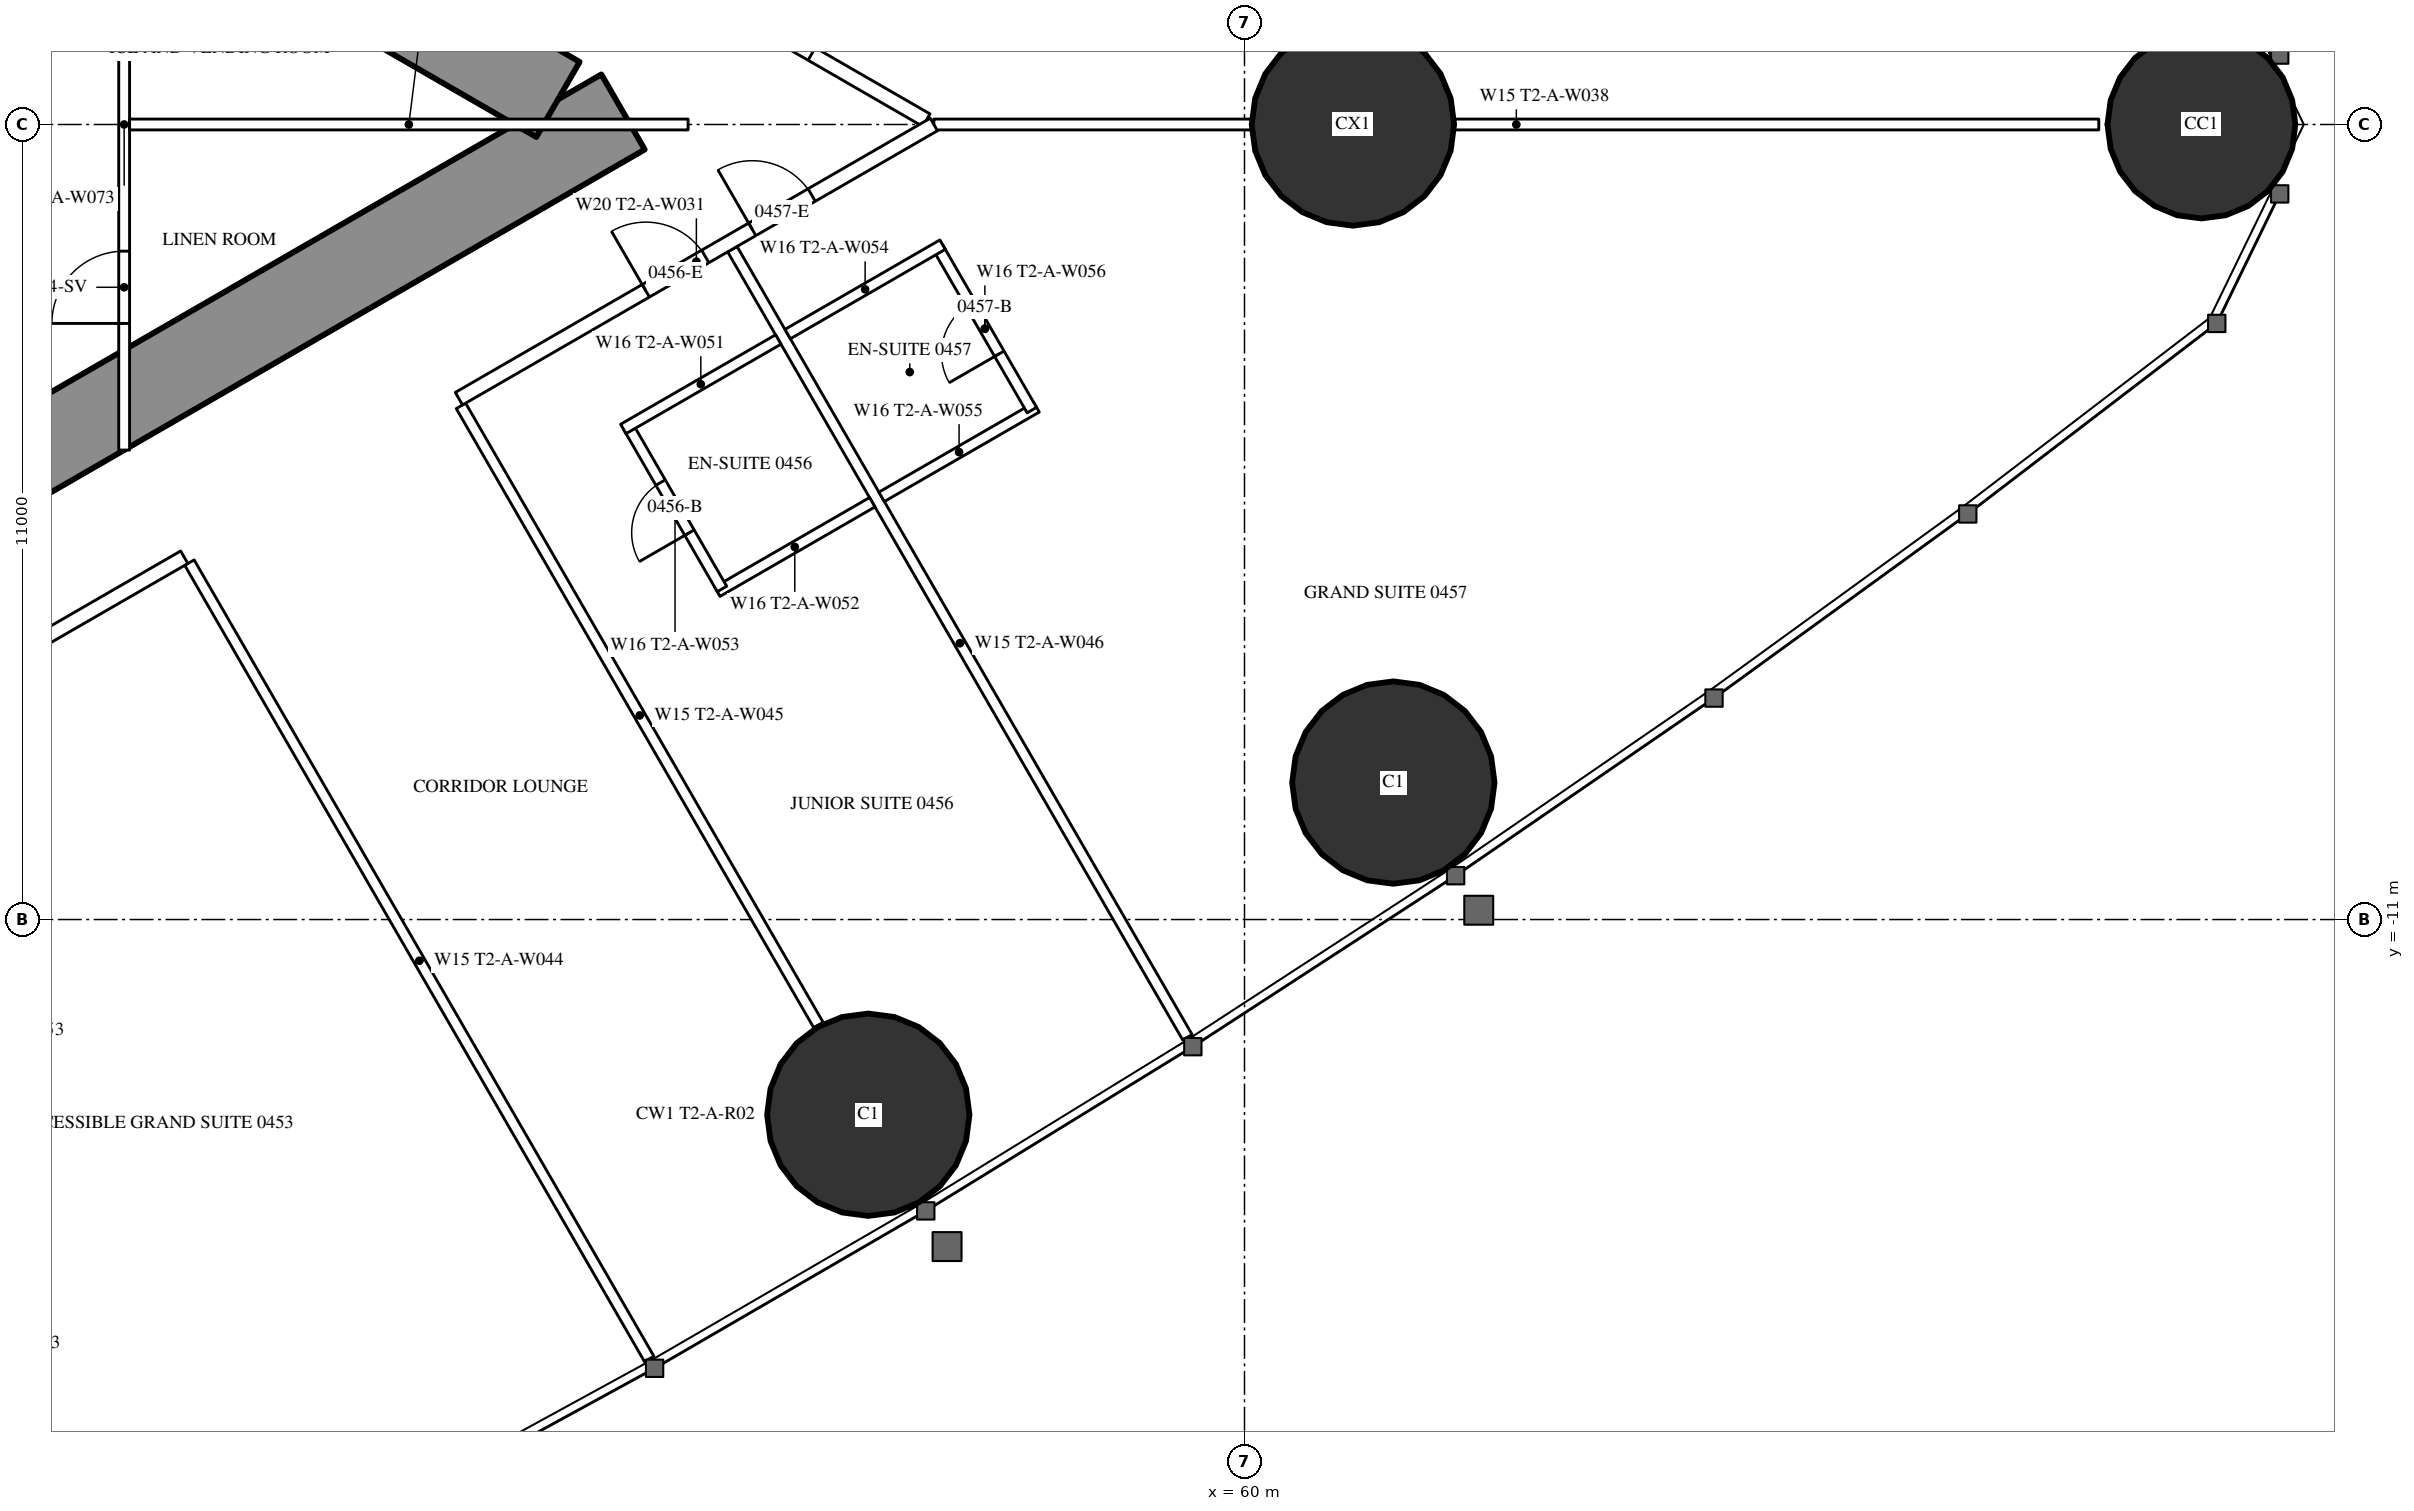
"""IFC4 building model, lengths in metres.
Left out: names, types, materials, properties, quantities, classifications, styles, units other than length and angle.
Written with IfcOpenShell. Run it as: python <this file> out.ifc"""

import sys

from ifc_helpers import new_model, si_unit, direction, frame, frame_2d, origin, origin_2d, place, context, subcontext, project, spatial, rectangle, hollow_circle, extrude, element, fill, save


model = new_model("IFC4")
c1 = context("Model", 3, precision=1e-05, world=origin(), true_north=direction((0.0, 1.0)))
c2 = subcontext(c1, "Body", "Model", "MODEL_VIEW")
j1 = project(units=[si_unit("LENGTHUNIT", "METRE"), si_unit("PLANEANGLEUNIT", "RADIAN")], contexts=[c1])
p1 = place(None, origin())
s1 = spatial("IfcSite", under=j1, at=p1, CompositionType="ELEMENT")
p2 = place(p1, origin())
s2 = spatial("IfcBuilding", under=s1, at=p2, CompositionType="ELEMENT")
p3 = place(p2, frame((0.0, 0.0, 21.5)))
s3 = spatial("IfcBuildingStorey", under=s2, at=p3, CompositionType="ELEMENT", Elevation=21.5)
p4 = place(p3, frame((73.239, 0.0, 0.0), z_axis=(0.0, 0.0, 1.0), x_axis=(1.0, 0.0, 0.0)))
e1 = element("IfcColumn", 1, at=p4, inside=s3, PredefinedType="COLUMN", context=c2, shape_type="SweptSolid", body=[
    extrude(hollow_circle(Radius=1.3, WallThickness=0.1, at=origin_2d()), origin(), (0.0, 0.0, 1.0), 3.5),
])
for number, where, z_axis, x_axis in (
    (2, (54.795, -13.701, 0.0), (0.0, 0.0, 1.0), (1.0, 0.0, 0.0)),
    (3, (62.059, -9.105, 0.0), (0.0, 0.0, 1.0), (1.0, 0.0, 0.0)),
):
    element("IfcColumn", number, at=place(p3, frame(where, z_axis=z_axis, x_axis=x_axis)), inside=s3, PredefinedType="COLUMN", context=c2, shape_type="SweptSolid", body=[
        extrude(hollow_circle(Radius=1.4, WallThickness=0.12, at=origin_2d()), origin(), (0.0, 0.0, 1.0), 3.5),
    ])
p5 = place(p3, frame((61.5, 0.0, 0.0), z_axis=(0.0, 0.0, 1.0), x_axis=(1.0, 0.0, 0.0)))
e4 = element("IfcColumn", 4, at=p5, inside=s3, PredefinedType="COLUMN", context=c2, shape_type="SweptSolid", body=[
    extrude(hollow_circle(Radius=1.4, WallThickness=0.1, at=origin_2d()), origin(), (0.0, 0.0, 1.0), 3.5),
])
p6 = place(p3, frame((27.2, -13.8, 0.0), z_axis=(0.0, 0.0, 1.0), x_axis=(0.866027159892, 0.499996958321, 0.0)))
e5 = element("IfcWall", 5, at=p6, inside=s3, PredefinedType="SHEAR", context=c2, shape_type="SweptSolid", body=[
    extrude(rectangle(XDim=27.947, YDim=1.2, at=frame_2d((13.973, 0.0))), origin(), (0.0, 0.0, 1.0), 3.5),
])
p7 = place(p6, frame((4.6, 0.0, 0.0)))
e6 = element("IfcOpeningElement", 6, at=p7, cuts=e5, PredefinedType="OPENING", context=c2, shape_type="SweptSolid", body=[
    extrude(rectangle(XDim=1.0, YDim=2.2, at=frame_2d((0.5, 1.1))), frame((0.0, 0.61, 0.0), z_axis=(0.0, -1.0, 0.0), x_axis=(1.0, 0.0, 0.0)), (0.0, 0.0, 1.0), 1.22),
])
p8 = place(p6, frame((13.395, 0.0, 0.0)))
e7 = element("IfcOpeningElement", 7, at=p8, cuts=e5, PredefinedType="OPENING", context=c2, shape_type="SweptSolid", body=[
    extrude(rectangle(XDim=1.8, YDim=2.2, at=frame_2d((0.9, 1.1))), frame((0.0, 0.61, 0.0), z_axis=(0.0, -1.0, 0.0), x_axis=(1.0, 0.0, 0.0)), (0.0, 0.0, 1.0), 1.22),
])
p9 = place(p3, frame((27.2, 13.8, 0.0), z_axis=(0.0, 0.0, 1.0), x_axis=(0.866024515034, -0.500001539357, 0.0)))
e8 = element("IfcWall", 8, at=p9, inside=s3, PredefinedType="SHEAR", context=c2, shape_type="SweptSolid", body=[
    extrude(rectangle(XDim=26.907, YDim=1.2, at=frame_2d((13.454, 0.0))), origin(), (0.0, 0.0, 1.0), 3.5),
])
p10 = place(p9, frame((4.6, 0.0, 0.0)))
e9 = element("IfcOpeningElement", 9, at=p10, cuts=e8, PredefinedType="OPENING", context=c2, shape_type="SweptSolid", body=[
    extrude(rectangle(XDim=1.0, YDim=2.2, at=frame_2d((0.5, 1.1))), frame((0.0, 0.61, 0.0), z_axis=(0.0, -1.0, 0.0), x_axis=(1.0, 0.0, 0.0)), (0.0, 0.0, 1.0), 1.22),
])
p11 = place(p9, frame((13.395, 0.0, 0.0)))
e10 = element("IfcOpeningElement", 10, at=p11, cuts=e8, PredefinedType="OPENING", context=c2, shape_type="SweptSolid", body=[
    extrude(rectangle(XDim=1.8, YDim=2.2, at=frame_2d((0.9, 1.1))), frame((0.0, 0.61, 0.0), z_axis=(0.0, -1.0, 0.0), x_axis=(1.0, 0.0, 0.0)), (0.0, 0.0, 1.0), 1.22),
])
p12 = place(p3, frame((45.403, -6.062, 0.0), z_axis=(0.0, 0.0, 1.0), x_axis=(0.500007077968, -0.866021317279, 0.0)))
e11 = element("IfcWall", 11, at=p12, inside=s3, PredefinedType="PARTITIONING", context=c2, shape_type="SweptSolid", body=[
    extrude(rectangle(XDim=12.721, YDim=0.15, at=frame_2d((6.361, 0.0))), origin(), (0.0, 0.0, 1.0), 3.25),
])
p13 = place(p3, frame((49.159, -3.893, 0.0), z_axis=(0.0, 0.0, 1.0), x_axis=(0.499998773722, -0.866026111775, 0.0)))
e12 = element("IfcWall", 12, at=p13, inside=s3, PredefinedType="PARTITIONING", context=c2, shape_type="SweptSolid", body=[
    extrude(rectangle(XDim=9.892, YDim=0.15, at=frame_2d((4.946, 0.0))), origin(), (0.0, 0.0, 1.0), 2.25),
])
p14 = place(p3, frame((52.915, -1.725, 0.0), z_axis=(0.0, 0.0, 1.0), x_axis=(0.499997163113, -0.866027041656, 0.0)))
e13 = element("IfcWall", 13, at=p14, inside=s3, PredefinedType="PARTITIONING", context=c2, shape_type="SweptSolid", body=[
    extrude(rectangle(XDim=12.591, YDim=0.15, at=frame_2d((6.295, 0.0))), origin(), (0.0, 0.0, 1.0), 3.25),
])
p15 = place(p3, frame((55.702, 0.0, 0.0), z_axis=(0.0, 0.0, 1.0), x_axis=(1.0, 0.0, 0.0)))
e14 = element("IfcWall", 14, at=p15, inside=s3, PredefinedType="PARTITIONING", context=c2, shape_type="SweptSolid", body=[
    extrude(rectangle(XDim=16.117, YDim=0.15, at=frame_2d((8.059, 0.0))), origin(), (0.0, 0.0, 1.0), 2.25),
])
p16 = place(p3, frame((36.834, 10.894, 0.0), z_axis=(0.0, 0.0, 1.0), x_axis=(0.866028157229, -0.499995230863, 0.0)))
e15 = element("IfcWall", 15, at=p16, inside=s3, PredefinedType="PARTITIONING", context=c2, shape_type="SweptSolid", body=[
    extrude(rectangle(XDim=21.667, YDim=0.2, at=frame_2d((10.833, 0.0))), origin(), (0.0, 0.0, 1.0), 3.25),
])
p17 = place(p16, frame((18.885, 0.0, 0.0)))
e16 = element("IfcOpeningElement", 16, at=p17, cuts=e15, PredefinedType="OPENING", context=c2, shape_type="SweptSolid", body=[
    extrude(rectangle(XDim=0.95, YDim=2.2, at=frame_2d((0.475, 1.1))), frame((0.0, 0.11, 0.0), z_axis=(0.0, -1.0, 0.0), x_axis=(1.0, 0.0, 0.0)), (0.0, 0.0, 1.0), 0.22),
])
p18 = place(p16, frame((14.835, 0.0, 0.0)))
e17 = element("IfcOpeningElement", 17, at=p18, cuts=e15, PredefinedType="OPENING", context=c2, shape_type="SweptSolid", body=[
    extrude(rectangle(XDim=0.95, YDim=2.2, at=frame_2d((0.475, 1.1))), frame((0.0, 0.11, 0.0), z_axis=(0.0, -1.0, 0.0), x_axis=(1.0, 0.0, 0.0)), (0.0, 0.0, 1.0), 0.22),
])
p19 = place(p16, frame((12.85, 0.0, 0.0)))
e18 = element("IfcOpeningElement", 18, at=p19, cuts=e15, PredefinedType="OPENING", context=c2, shape_type="SweptSolid", body=[
    extrude(rectangle(XDim=0.95, YDim=2.2, at=frame_2d((0.475, 1.1))), frame((0.0, 0.11, 0.0), z_axis=(0.0, -1.0, 0.0), x_axis=(1.0, 0.0, 0.0)), (0.0, 0.0, 1.0), 0.22),
])
p20 = place(p16, frame((1.542, 0.0, 0.0)))
e19 = element("IfcOpeningElement", 19, at=p20, cuts=e15, PredefinedType="OPENING", context=c2, shape_type="SweptSolid", body=[
    extrude(rectangle(XDim=0.95, YDim=2.2, at=frame_2d((0.475, 1.1))), frame((0.0, 0.11, 0.0), z_axis=(0.0, -1.0, 0.0), x_axis=(1.0, 0.0, 0.0)), (0.0, 0.0, 1.0), 0.22),
])
p21 = place(p3, frame((37.96, -10.243, 0.0), z_axis=(0.0, 0.0, 1.0), x_axis=(0.866024617314, 0.500001362204, 0.0)))
e20 = element("IfcWall", 20, at=p21, inside=s3, PredefinedType="PARTITIONING", context=c2, shape_type="SweptSolid", body=[
    extrude(rectangle(XDim=8.512, YDim=0.2, at=frame_2d((4.256, 0.0))), origin(), (0.0, 0.0, 1.0), 3.25),
])
p22 = place(p21, frame((3.35, 0.0, 0.0)))
e21 = element("IfcOpeningElement", 21, at=p22, cuts=e20, PredefinedType="OPENING", context=c2, shape_type="SweptSolid", body=[
    extrude(rectangle(XDim=1.0, YDim=2.2, at=frame_2d((0.5, 1.1))), frame((0.0, 0.11, 0.0), z_axis=(0.0, -1.0, 0.0), x_axis=(1.0, 0.0, 0.0)), (0.0, 0.0, 1.0), 0.22),
])
p23 = place(p3, frame((49.131, -3.794, 0.0), z_axis=(0.0, 0.0, 1.0), x_axis=(0.866030732979, 0.499990769451, 0.0)))
e22 = element("IfcWall", 22, at=p23, inside=s3, PredefinedType="PARTITIONING", context=c2, shape_type="SweptSolid", body=[
    extrude(rectangle(XDim=7.588, YDim=0.2, at=frame_2d((3.794, 0.0))), origin(), (0.0, 0.0, 1.0), 3.25),
])
p24 = place(p23, frame((2.986, 0.0, 0.0)))
e23 = element("IfcOpeningElement", 23, at=p24, cuts=e22, PredefinedType="OPENING", context=c2, shape_type="SweptSolid", body=[
    extrude(rectangle(XDim=0.95, YDim=2.2, at=frame_2d((0.475, 1.1))), frame((0.0, 0.11, 0.0), z_axis=(0.0, -1.0, 0.0), x_axis=(1.0, 0.0, 0.0)), (0.0, 0.0, 1.0), 0.22),
])
p25 = place(p23, frame((4.686, 0.0, 0.0)))
e24 = element("IfcOpeningElement", 24, at=p25, cuts=e22, PredefinedType="OPENING", context=c2, shape_type="SweptSolid", body=[
    extrude(rectangle(XDim=0.95, YDim=2.2, at=frame_2d((0.475, 1.1))), frame((0.0, 0.11, 0.0), z_axis=(0.0, -1.0, 0.0), x_axis=(1.0, 0.0, 0.0)), (0.0, 0.0, 1.0), 0.22),
])
p26 = place(p3, frame((52.706, -6.464, 0.0), z_axis=(0.0, 0.0, 1.0), x_axis=(0.86604923931, 0.499958713387, 0.0)))
e25 = element("IfcWall", 25, at=p26, inside=s3, PredefinedType="PARTITIONING", context=c2, shape_type="SweptSolid", body=[
    extrude(rectangle(XDim=2.475, YDim=0.15, at=frame_2d((1.237, 0.0))), origin(), (0.0, 0.0, 1.0), 3.25),
])
p27 = place(p3, frame((51.471, -4.175, 0.0), z_axis=(0.0, 0.0, 1.0), x_axis=(0.500006934395, -0.866021400173, 0.0)))
e26 = element("IfcWall", 26, at=p27, inside=s3, PredefinedType="PARTITIONING", context=c2, shape_type="SweptSolid", body=[
    extrude(rectangle(XDim=2.6, YDim=0.15, at=frame_2d((1.3, 0.0))), origin(), (0.0, 0.0, 1.0), 3.25),
])
p28 = place(p27, frame((0.9, 0.0, 0.0)))
e27 = element("IfcOpeningElement", 27, at=p28, cuts=e26, PredefinedType="OPENING", context=c2, shape_type="SweptSolid", body=[
    extrude(rectangle(XDim=0.8, YDim=2.2, at=frame_2d((0.4, 1.1))), frame((0.0, 0.085, 0.0), z_axis=(0.0, -1.0, 0.0), x_axis=(1.0, 0.0, 0.0)), (0.0, 0.0, 1.0), 0.17),
])
p29 = place(p3, frame((51.406, -4.212, 0.0), z_axis=(0.0, 0.0, 1.0), x_axis=(0.866031185235, 0.4999899861, 0.0)))
e28 = element("IfcWall", 28, at=p29, inside=s3, PredefinedType="PARTITIONING", context=c2, shape_type="SweptSolid", body=[
    extrude(rectangle(XDim=2.475, YDim=0.15, at=frame_2d((1.238, 0.0))), origin(), (0.0, 0.0, 1.0), 3.25),
])
p30 = place(p3, frame((54.98, -5.151, 0.0), z_axis=(0.0, 0.0, 1.0), x_axis=(0.86604923931, 0.499958713387, 0.0)))
e29 = element("IfcWall", 29, at=p30, inside=s3, PredefinedType="PARTITIONING", context=c2, shape_type="SweptSolid", body=[
    extrude(rectangle(XDim=2.475, YDim=0.15, at=frame_2d((1.237, 0.0))), origin(), (0.0, 0.0, 1.0), 3.25),
])
p31 = place(p3, frame((55.758, -1.7, 0.0), z_axis=(0.0, 0.0, 1.0), x_axis=(0.500006934395, -0.866021400173, 0.0)))
e30 = element("IfcWall", 30, at=p31, inside=s3, PredefinedType="PARTITIONING", context=c2, shape_type="SweptSolid", body=[
    extrude(rectangle(XDim=2.6, YDim=0.15, at=frame_2d((1.3, 0.0))), origin(), (0.0, 0.0, 1.0), 3.25),
])
p32 = place(p31, frame((0.9, 0.0, 0.0)))
e31 = element("IfcOpeningElement", 31, at=p32, cuts=e30, PredefinedType="OPENING", context=c2, shape_type="SweptSolid", body=[
    extrude(rectangle(XDim=0.8, YDim=2.2, at=frame_2d((0.4, 1.1))), frame((0.0, 0.085, 0.0), z_axis=(0.0, -1.0, 0.0), x_axis=(1.0, 0.0, 0.0)), (0.0, 0.0, 1.0), 0.17),
])
p33 = place(p3, frame((53.68, -2.9, 0.0), z_axis=(0.0, 0.0, 1.0), x_axis=(0.866006523861, 0.500032699561, 0.0)))
e32 = element("IfcWall", 32, at=p33, inside=s3, PredefinedType="PARTITIONING", context=c2, shape_type="SweptSolid", body=[
    extrude(rectangle(XDim=2.475, YDim=0.15, at=frame_2d((1.237, 0.0))), origin(), (0.0, 0.0, 1.0), 3.25),
])
p34 = place(p3, frame((44.5, -4.505, 0.0), z_axis=(0.0, 0.0, 1.0), x_axis=(0.0, 1.0, 0.0)))
e33 = element("IfcWall", 33, at=p34, inside=s3, PredefinedType="PARTITIONING", context=c2, shape_type="SweptSolid", body=[
    extrude(rectangle(XDim=9.009, YDim=0.15, at=frame_2d((4.505, 0.0))), origin(), (0.0, 0.0, 1.0), 2.45),
])
p35 = place(p34, frame((1.752, 0.0, 0.0)))
e34 = element("IfcOpeningElement", 34, at=p35, cuts=e33, PredefinedType="OPENING", context=c2, shape_type="SweptSolid", body=[
    extrude(rectangle(XDim=1.0, YDim=2.2, at=frame_2d((0.5, 1.1))), frame((0.0, 0.085, 0.0), z_axis=(0.0, -1.0, 0.0), x_axis=(1.0, 0.0, 0.0)), (0.0, 0.0, 1.0), 0.17),
])
p36 = place(p34, frame((6.257, 0.0, 0.0)))
e35 = element("IfcOpeningElement", 35, at=p36, cuts=e33, PredefinedType="OPENING", context=c2, shape_type="SweptSolid", body=[
    extrude(rectangle(XDim=1.0, YDim=2.2, at=frame_2d((0.5, 1.1))), frame((0.0, 0.085, 0.0), z_axis=(0.0, -1.0, 0.0), x_axis=(1.0, 0.0, 0.0)), (0.0, 0.0, 1.0), 0.17),
])
p37 = place(p3, frame((44.575, 0.0, 0.0), z_axis=(0.0, 0.0, 1.0), x_axis=(1.0, 0.0, 0.0)))
e36 = element("IfcWall", 36, at=p37, inside=s3, PredefinedType="PARTITIONING", context=c2, shape_type="SweptSolid", body=[
    extrude(rectangle(XDim=7.727, YDim=0.15, at=frame_2d((3.864, 0.0))), origin(), (0.0, 0.0, 1.0), 2.25),
])
p38 = place(p28, origin())
e37 = element("IfcDoor", 37, at=p38, inside=s3, OperationType="SINGLE_SWING_RIGHT", PredefinedType="DOOR", context=c2, shape_type="SweptSolid", body=[
    extrude(rectangle(XDim=0.8, YDim=2.2, at=frame_2d((0.4, 1.1))), frame((0.0, 0.025, 0.0), z_axis=(0.0, -1.0, 0.0), x_axis=(1.0, 0.0, 0.0)), (0.0, 0.0, 1.0), 0.05),
])
fill(e27, e37)
p39 = place(p24, origin())
e38 = element("IfcDoor", 38, at=p39, inside=s3, OperationType="SINGLE_SWING_LEFT", PredefinedType="DOOR", context=c2, shape_type="SweptSolid", body=[
    extrude(rectangle(XDim=0.95, YDim=2.2, at=frame_2d((0.475, 1.1))), frame((0.0, 0.025, 0.0), z_axis=(0.0, -1.0, 0.0), x_axis=(1.0, 0.0, 0.0)), (0.0, 0.0, 1.0), 0.05),
])
fill(e23, e38)
p40 = place(p32, origin())
e39 = element("IfcDoor", 39, at=p40, inside=s3, OperationType="SINGLE_SWING_RIGHT", PredefinedType="DOOR", context=c2, shape_type="SweptSolid", body=[
    extrude(rectangle(XDim=0.8, YDim=2.2, at=frame_2d((0.4, 1.1))), frame((0.0, 0.025, 0.0), z_axis=(0.0, -1.0, 0.0), x_axis=(1.0, 0.0, 0.0)), (0.0, 0.0, 1.0), 0.05),
])
fill(e31, e39)
p41 = place(p25, origin())
e40 = element("IfcDoor", 40, at=p41, inside=s3, OperationType="SINGLE_SWING_LEFT", PredefinedType="DOOR", context=c2, shape_type="SweptSolid", body=[
    extrude(rectangle(XDim=0.95, YDim=2.2, at=frame_2d((0.475, 1.1))), frame((0.0, 0.025, 0.0), z_axis=(0.0, -1.0, 0.0), x_axis=(1.0, 0.0, 0.0)), (0.0, 0.0, 1.0), 0.05),
])
fill(e24, e40)
p42 = place(p17, origin())
e41 = element("IfcDoor", 41, at=p42, inside=s3, OperationType="SINGLE_SWING_LEFT", PredefinedType="DOOR", context=c2, shape_type="SweptSolid", body=[
    extrude(rectangle(XDim=0.95, YDim=2.2, at=frame_2d((0.475, 1.1))), frame((0.0, 0.025, 0.0), z_axis=(0.0, -1.0, 0.0), x_axis=(1.0, 0.0, 0.0)), (0.0, 0.0, 1.0), 0.05),
])
fill(e16, e41)
p43 = place(p35, origin())
e42 = element("IfcDoor", 42, at=p43, inside=s3, OperationType="SINGLE_SWING_LEFT", PredefinedType="DOOR", context=c2, shape_type="SweptSolid", body=[
    extrude(rectangle(XDim=1.0, YDim=2.2, at=frame_2d((0.5, 1.1))), frame((0.0, 0.025, 0.0), z_axis=(0.0, -1.0, 0.0), x_axis=(1.0, 0.0, 0.0)), (0.0, 0.0, 1.0), 0.05),
])
fill(e34, e42)
save(model, sys.argv[1])
